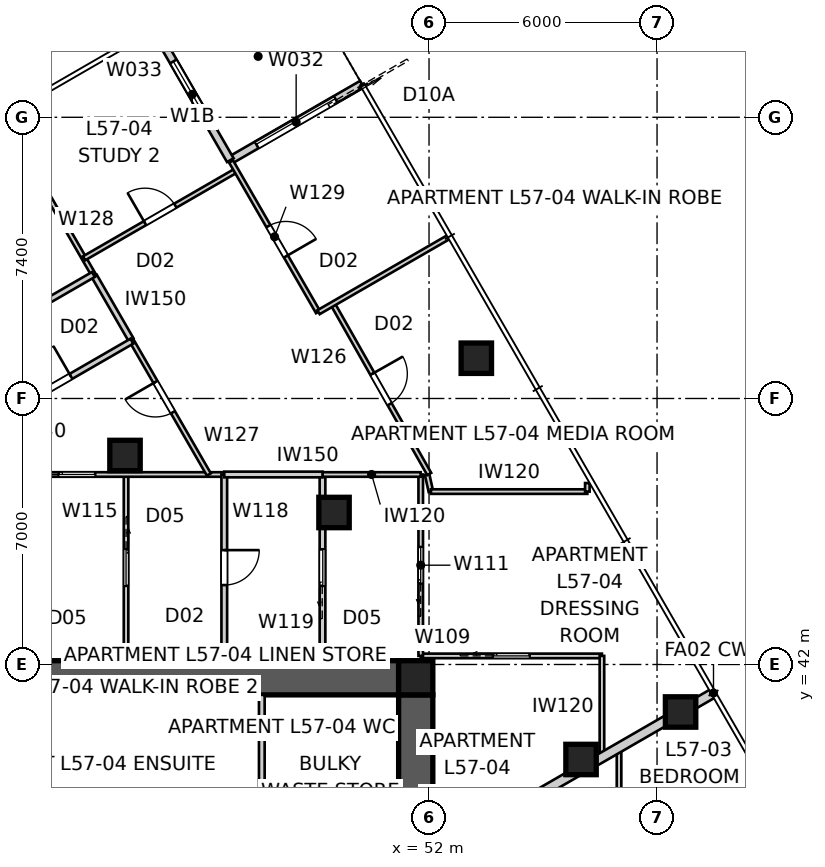
"""IFC4 building model, lengths in metres.
Left out: names, types, materials, properties, quantities, classifications, styles, units other than length and angle.
Written with IfcOpenShell. Run it as: python <this file> out.ifc"""

import sys

from ifc_helpers import new_model, si_unit, direction, frame, frame_2d, origin, origin_2d, place, context, subcontext, project, spatial, polyline, rectangle, outline, extrude, element, fill, save


model = new_model("IFC4")
c1 = context("Model", 3, precision=1e-05, world=origin(), true_north=direction((0.0, 1.0)))
c2 = subcontext(c1, "Body", "Model", "MODEL_VIEW")
j1 = project(units=[si_unit("LENGTHUNIT", "METRE"), si_unit("PLANEANGLEUNIT", "RADIAN")], contexts=[c1])
p1 = place(None, origin())
s1 = spatial("IfcSite", under=j1, at=p1, CompositionType="ELEMENT")
p2 = place(p1, origin())
s2 = spatial("IfcBuilding", under=s1, at=p2, CompositionType="ELEMENT")
p3 = place(p2, frame((0.0, 0.0, 208.2)))
s3 = spatial("IfcBuildingStorey", under=s2, at=p3, CompositionType="ELEMENT", Elevation=208.2)
p4 = place(p3, frame((28.8, 41.65, 0.0), z_axis=(0.0, 0.0, 1.0), x_axis=(1.0, 0.0, 0.0)))
e1 = element("IfcWall", 1, at=p4, inside=s3, PredefinedType="SHEAR", context=c2, shape_type="SweptSolid", body=[
    extrude(outline(polyline([(0.0, -0.45), (22.4, -0.45), (22.4, -0.025), (22.85, -0.025), (22.85, 0.025), (22.4, 0.025), (22.4, 0.45), (0.0, 0.45), (0.0, 0.025), (-0.45, 0.025), (-0.45, -0.025), (0.0, -0.025), (0.0, -0.45)])), origin(), (0.0, 0.0, 1.0), 3.4),
])
p5 = place(p3, frame((51.65, 18.8, 0.0), z_axis=(0.0, 0.0, 1.0), x_axis=(0.0, 1.0, 0.0)))
e2 = element("IfcWall", 2, at=p5, inside=s3, PredefinedType="SHEAR", context=c2, shape_type="SweptSolid", body=[
    extrude(outline(polyline([(0.0, -0.45), (22.4, -0.45), (22.4, -0.025), (22.85, -0.025), (22.85, 0.025), (22.4, 0.025), (22.4, 0.45), (0.0, 0.45), (0.0, 0.025), (-0.45, 0.025), (-0.45, -0.025), (0.0, -0.025), (0.0, -0.45)])), origin(), (0.0, 0.0, 1.0), 3.4),
])
p6 = place(p5, frame((11.14, 0.0, 0.0)))
e3 = element("IfcOpeningElement", 3, at=p6, cuts=e2, PredefinedType="OPENING", context=c2, shape_type="SweptSolid", body=[
    extrude(rectangle(XDim=1.02, YDim=2.4, at=frame_2d((0.51, 1.2))), frame((0.0, 0.46, 0.0), z_axis=(0.0, -1.0, 0.0), x_axis=(1.0, 0.0, 0.0)), (0.0, 0.0, 1.0), 0.92),
])
p7 = place(p3, frame((51.65, 41.65, 0.0), z_axis=(0.0, 0.0, 1.0), x_axis=(1.0, 0.0, 0.0)))
e4 = element("IfcColumn", 4, at=p7, inside=s3, PredefinedType="COLUMN", context=c2, shape_type="SweptSolid", body=[
    extrude(rectangle(XDim=0.9, YDim=0.9, at=origin_2d()), origin(), (0.0, 0.0, 1.0), 3.4),
])
for number, where, z_axis, x_axis in (
    (5, (58.62, 40.75, -0.15), (0.0, 0.0, 1.0), (1.0, 0.0, 0.0)),
    (6, (53.245, 50.06, -0.15), (0.0, 0.0, 1.0), (1.0, 0.0, 0.0)),
):
    element("IfcColumn", number, at=place(p3, frame(where, z_axis=z_axis, x_axis=x_axis)), inside=s3, PredefinedType="COLUMN", context=c2, shape_type="SweptSolid", body=[
        extrude(rectangle(XDim=0.8, YDim=0.8, at=origin_2d()), origin(), (0.0, 0.0, 1.0), 3.55),
    ])
for number, where, z_axis, x_axis in (
    (7, (56.0, 39.5, 0.0), (0.0, 0.0, 1.0), (1.0, 0.0, 0.0)),
    (8, (49.5, 46.0, 0.0), (0.0, 0.0, 1.0), (1.0, 0.0, 0.0)),
    (9, (44.0, 47.5, 0.0), (0.0, 0.0, 1.0), (1.0, 0.0, 0.0)),
):
    element("IfcColumn", number, at=place(p3, frame(where, z_axis=z_axis, x_axis=x_axis)), inside=s3, PredefinedType="COLUMN", context=c2, shape_type="SweptSolid", body=[
        extrude(rectangle(XDim=0.8, YDim=0.8, at=origin_2d()), origin(), (0.0, 0.0, 1.0), 3.4),
    ])
p8 = place(p3, frame((50.236, 57.271, 0.0), z_axis=(0.0, 0.0, 1.0), x_axis=(-0.866026010844, -0.49999894854, 0.0)))
e10 = element("IfcWall", 10, at=p8, inside=s3, PredefinedType="SOLIDWALL", context=c2, shape_type="SweptSolid", body=[
    extrude(rectangle(XDim=4.0, YDim=0.2, at=frame_2d((2.0, 0.0))), origin(), (0.0, 0.0, 1.0), 3.25),
])
p9 = place(p8, frame((0.8, 0.0, 0.0)))
e11 = element("IfcOpeningElement", 11, at=p9, cuts=e10, PredefinedType="OPENING", context=c2, shape_type="SweptSolid", body=[
    extrude(rectangle(XDim=2.4, YDim=2.1, at=frame_2d((1.2, 1.05))), frame((0.0, 0.11, 0.0), z_axis=(0.0, -1.0, 0.0), x_axis=(1.0, 0.0, 0.0)), (0.0, 0.0, 1.0), 0.22),
])
p10 = place(p3, frame((46.771, 55.271, 0.0), z_axis=(0.0, 0.0, 1.0), x_axis=(-0.49999894854, 0.866026010844, 0.0)))
e12 = element("IfcWall", 12, at=p10, inside=s3, PredefinedType="SOLIDWALL", context=c2, shape_type="SweptSolid", body=[
    extrude(rectangle(XDim=4.0, YDim=0.2, at=frame_2d((2.0, 0.0))), origin(), (0.0, 0.0, 1.0), 3.25),
])
p11 = place(p10, frame((1.0, 0.0, 0.45)))
e13 = element("IfcOpeningElement", 13, at=p11, cuts=e12, PredefinedType="OPENING", context=c2, shape_type="SweptSolid", body=[
    extrude(rectangle(XDim=2.0, YDim=1.8, at=frame_2d((1.0, 0.9))), frame((0.0, 0.11, 0.0), z_axis=(0.0, -1.0, 0.0), x_axis=(1.0, 0.0, 0.0)), (0.0, 0.0, 1.0), 0.22),
])
p12 = place(p3, frame((59.486, 41.25, 0.0), z_axis=(0.0, 0.0, 1.0), x_axis=(-0.866020489494, -0.500008511703, 0.0)))
e14 = element("IfcWall", 14, at=p12, inside=s3, PredefinedType="PARTITIONING", context=c2, shape_type="SweptSolid", body=[
    extrude(rectangle(XDim=8.496, YDim=0.25, at=frame_2d((4.248, 0.0))), origin(), (0.0, 0.0, 1.0), 3.25),
])
p13 = place(p3, frame((47.6, 41.2, 0.0), z_axis=(0.0, 0.0, 1.0), x_axis=(0.0, -1.0, 0.0)))
e15 = element("IfcWall", 15, at=p13, inside=s3, PredefinedType="SOLIDWALL", context=c2, shape_type="SweptSolid", body=[
    extrude(rectangle(XDim=5.9, YDim=0.15, at=frame_2d((2.95, 0.0))), origin(), (0.0, 0.0, 1.0), 3.25),
])
p14 = place(p3, frame((57.0, 39.815, 0.0), z_axis=(0.0, 0.0, 1.0), x_axis=(0.0, -1.0, 0.0)))
e16 = element("IfcWall", 16, at=p14, inside=s3, PredefinedType="PARTITIONING", context=c2, shape_type="SweptSolid", body=[
    extrude(rectangle(XDim=21.919, YDim=0.12, at=frame_2d((10.959, 0.0))), origin(), (0.0, 0.0, 1.0), 2.55),
])
p15 = place(p14, frame((7.551, 0.0, 0.0)))
e17 = element("IfcOpeningElement", 17, at=p15, cuts=e16, PredefinedType="OPENING", context=c2, shape_type="SweptSolid", body=[
    extrude(rectangle(XDim=0.92, YDim=2.34, at=frame_2d((0.46, 1.17))), frame((0.0, 0.07, 0.0), z_axis=(0.0, -1.0, 0.0), x_axis=(1.0, 0.0, 0.0)), (0.0, 0.0, 1.0), 0.14),
])
p16 = place(p14, frame((12.32, 0.0, 0.0)))
e18 = element("IfcOpeningElement", 18, at=p16, cuts=e16, PredefinedType="OPENING", context=c2, shape_type="SweptSolid", body=[
    extrude(rectangle(XDim=0.92, YDim=2.34, at=frame_2d((0.46, 1.17))), frame((0.0, 0.07, 0.0), z_axis=(0.0, -1.0, 0.0), x_axis=(1.0, 0.0, 0.0)), (0.0, 0.0, 1.0), 0.14),
])
p17 = place(p3, frame((51.782, 42.226, 0.0), z_axis=(0.0, 0.0, 1.0), x_axis=(1.0, 0.0, 0.0)))
e19 = element("IfcWall", 19, at=p17, inside=s3, PredefinedType="PARTITIONING", context=c2, shape_type="SweptSolid", body=[
    extrude(rectangle(XDim=4.768, YDim=0.12, at=frame_2d((2.384, 0.0))), origin(), (0.0, 0.0, 1.0), 3.25),
])
p18 = place(p17, frame((1.904, 0.0, 0.0)))
e20 = element("IfcOpeningElement", 20, at=p18, cuts=e19, PredefinedType="OPENING", context=c2, shape_type="SweptSolid", body=[
    extrude(rectangle(XDim=0.96, YDim=2.1, at=frame_2d((0.48, 1.05))), frame((0.0, 0.07, 0.0), z_axis=(0.0, -1.0, 0.0), x_axis=(1.0, 0.0, 0.0)), (0.0, 0.0, 1.0), 0.14),
])
p19 = place(p3, frame((56.55, 42.226, 0.0), z_axis=(0.0, 0.0, 1.0), x_axis=(0.0, -1.0, 0.0)))
e21 = element("IfcWall", 21, at=p19, inside=s3, PredefinedType="PARTITIONING", context=c2, shape_type="SweptSolid", body=[
    extrude(rectangle(XDim=2.671, YDim=0.12, at=frame_2d((1.335, 0.0))), origin(), (0.0, 0.0, 1.0), 3.25),
])
p20 = place(p3, frame((51.782, 42.226, 0.0), z_axis=(0.0, 0.0, 1.0), x_axis=(0.0, 1.0, 0.0)))
e22 = element("IfcWall", 22, at=p20, inside=s3, PredefinedType="PARTITIONING", context=c2, shape_type="SweptSolid", body=[
    extrude(rectangle(XDim=4.774, YDim=0.12, at=frame_2d((2.387, 0.0))), origin(), (0.0, 0.0, 1.0), 3.25),
])
p21 = place(p20, frame((1.907, 0.0, 0.0)))
e23 = element("IfcOpeningElement", 23, at=p21, cuts=e22, PredefinedType="OPENING", context=c2, shape_type="SweptSolid", body=[
    extrude(rectangle(XDim=0.96, YDim=2.1, at=frame_2d((0.48, 1.05))), frame((0.0, 0.07, 0.0), z_axis=(0.0, -1.0, 0.0), x_axis=(1.0, 0.0, 0.0)), (0.0, 0.0, 1.0), 0.14),
])
p22 = place(p3, frame((51.949, 47.0, 0.0), z_axis=(0.0, 0.0, 1.0), x_axis=(0.21715477266, -0.976137185395, 0.0)))
e24 = element("IfcWall", 24, at=p22, inside=s3, PredefinedType="PARTITIONING", context=c2, shape_type="SweptSolid", body=[
    extrude(rectangle(XDim=0.461, YDim=0.12, at=frame_2d((0.23, 0.0))), origin(), (0.0, 0.0, 1.0), 3.25),
])
p23 = place(p3, frame((52.049, 46.55, 0.0), z_axis=(0.0, 0.0, 1.0), x_axis=(1.0, 0.0, 0.0)))
e25 = element("IfcWall", 25, at=p23, inside=s3, PredefinedType="PARTITIONING", context=c2, shape_type="SweptSolid", body=[
    extrude(rectangle(XDim=4.116, YDim=0.12, at=frame_2d((2.058, 0.0))), origin(), (0.0, 0.0, 1.0), 3.25),
])
p24 = place(p3, frame((56.166, 46.55, 0.0), z_axis=(0.0, 0.0, 1.0), x_axis=(0.0, 1.0, 0.0)))
e26 = element("IfcWall", 26, at=p24, inside=s3, PredefinedType="PARTITIONING", context=c2, shape_type="SweptSolid", body=[
    extrude(rectangle(XDim=0.225, YDim=0.12, at=frame_2d((0.112, 0.0))), origin(), (0.0, 0.0, 1.0), 3.25),
])
p25 = place(p3, frame((44.028, 47.0, 0.0), z_axis=(0.0, 0.0, 1.0), x_axis=(0.0, -1.0, 0.0)))
e27 = element("IfcWall", 27, at=p25, inside=s3, PredefinedType="PARTITIONING", context=c2, shape_type="SweptSolid", body=[
    extrude(rectangle(XDim=4.9, YDim=0.12, at=frame_2d((2.45, 0.0))), origin(), (0.0, 0.0, 1.0), 3.25),
])
p26 = place(p25, frame((1.97, 0.0, 0.0)))
e28 = element("IfcOpeningElement", 28, at=p26, cuts=e27, PredefinedType="OPENING", context=c2, shape_type="SweptSolid", body=[
    extrude(rectangle(XDim=0.96, YDim=2.1, at=frame_2d((0.48, 1.05))), frame((0.0, 0.07, 0.0), z_axis=(0.0, -1.0, 0.0), x_axis=(1.0, 0.0, 0.0)), (0.0, 0.0, 1.0), 0.14),
])
p27 = place(p3, frame((40.808, 47.0, 0.0), z_axis=(0.0, 0.0, 1.0), x_axis=(1.0, 0.0, 0.0)))
e29 = element("IfcWall", 29, at=p27, inside=s3, PredefinedType="PARTITIONING", context=c2, shape_type="SweptSolid", body=[
    extrude(rectangle(XDim=5.804, YDim=0.12, at=frame_2d((2.902, 0.0))), origin(), (0.0, 0.0, 1.0), 2.55),
])
p28 = place(p27, frame((1.447, 0.0, 0.0)))
e30 = element("IfcOpeningElement", 30, at=p28, cuts=e29, PredefinedType="OPENING", context=c2, shape_type="SweptSolid", body=[
    extrude(rectangle(XDim=0.96, YDim=2.1, at=frame_2d((0.48, 1.05))), frame((0.0, 0.07, 0.0), z_axis=(0.0, -1.0, 0.0), x_axis=(1.0, 0.0, 0.0)), (0.0, 0.0, 1.0), 0.14),
])
p29 = place(p3, frame((46.612, 47.0, 0.0), z_axis=(0.0, 0.0, 1.0), x_axis=(0.0, -1.0, 0.0)))
e31 = element("IfcWall", 31, at=p29, inside=s3, PredefinedType="SOLIDWALL", context=c2, shape_type="SweptSolid", body=[
    extrude(rectangle(XDim=4.9, YDim=0.15, at=frame_2d((2.45, 0.0))), origin(), (0.0, 0.0, 1.0), 3.25),
])
p30 = place(p29, frame((1.99, 0.0, 0.0)))
e32 = element("IfcOpeningElement", 32, at=p30, cuts=e31, PredefinedType="OPENING", context=c2, shape_type="SweptSolid", body=[
    extrude(rectangle(XDim=0.92, YDim=2.34, at=frame_2d((0.46, 1.17))), frame((0.0, 0.085, 0.0), z_axis=(0.0, -1.0, 0.0), x_axis=(1.0, 0.0, 0.0)), (0.0, 0.0, 1.0), 0.17),
])
p31 = place(p3, frame((49.197, 42.1, 0.0), z_axis=(0.0, 0.0, 1.0), x_axis=(0.0, 1.0, 0.0)))
e33 = element("IfcWall", 33, at=p31, inside=s3, PredefinedType="SOLIDWALL", context=c2, shape_type="SweptSolid", body=[
    extrude(rectangle(XDim=4.9, YDim=0.15, at=frame_2d((2.45, 0.0))), origin(), (0.0, 0.0, 1.0), 3.25),
])
p32 = place(p31, frame((1.97, 0.0, 0.0)))
e34 = element("IfcOpeningElement", 34, at=p32, cuts=e33, PredefinedType="OPENING", context=c2, shape_type="SweptSolid", body=[
    extrude(rectangle(XDim=0.96, YDim=2.1, at=frame_2d((0.48, 1.05))), frame((0.0, 0.085, 0.0), z_axis=(0.0, -1.0, 0.0), x_axis=(1.0, 0.0, 0.0)), (0.0, 0.0, 1.0), 0.17),
])
p33 = place(p3, frame((49.197, 47.0, 0.0), z_axis=(0.0, 0.0, 1.0), x_axis=(1.0, 0.0, 0.0)))
e35 = element("IfcWall", 35, at=p33, inside=s3, PredefinedType="PARTITIONING", context=c2, shape_type="SweptSolid", body=[
    extrude(rectangle(XDim=2.585, YDim=0.12, at=frame_2d((1.292, 0.0))), origin(), (0.0, 0.0, 1.0), 3.25),
])
p34 = place(p3, frame((46.612, 47.0, 0.0), z_axis=(0.0, 0.0, 1.0), x_axis=(1.0, 0.0, 0.0)))
e36 = element("IfcWall", 36, at=p34, inside=s3, PredefinedType="SOLIDWALL", context=c2, shape_type="SweptSolid", body=[
    extrude(rectangle(XDim=2.585, YDim=0.15, at=frame_2d((1.292, 0.0))), origin(), (0.0, 0.0, 1.0), 3.25),
])
p35 = place(p3, frame((43.193, 52.219, 0.0), z_axis=(0.0, 0.0, 1.0), x_axis=(-0.50000634465, 0.866021740668, 0.0)))
e37 = element("IfcWall", 37, at=p35, inside=s3, PredefinedType="PARTITIONING", context=c2, shape_type="SweptSolid", body=[
    extrude(rectangle(XDim=4.814, YDim=0.12, at=frame_2d((2.407, 0.0))), origin(), (0.0, 0.0, 1.0), 3.25),
])
p36 = place(p3, frame((49.467, 51.487, 0.0), z_axis=(0.0, 0.0, 1.0), x_axis=(0.49354052196, -0.869722802497, 0.0)))
e38 = element("IfcWall", 38, at=p36, inside=s3, PredefinedType="PARTITIONING", context=c2, shape_type="SweptSolid", body=[
    extrude(rectangle(XDim=5.145, YDim=0.12, at=frame_2d((2.572, 0.0))), origin(), (0.0, 0.0, 1.0), 3.25),
])
p37 = place(p36, frame((2.112, 0.0, 0.0)))
e39 = element("IfcOpeningElement", 39, at=p37, cuts=e38, PredefinedType="OPENING", context=c2, shape_type="SweptSolid", body=[
    extrude(rectangle(XDim=0.92, YDim=2.34, at=frame_2d((0.46, 1.17))), frame((0.0, 0.07, 0.0), z_axis=(0.0, -1.0, 0.0), x_axis=(1.0, 0.0, 0.0)), (0.0, 0.0, 1.0), 0.14),
])
p38 = place(p3, frame((46.207, 47.0, 0.0), z_axis=(0.0, 0.0, 1.0), x_axis=(-0.499986975689, 0.866032923243, 0.0)))
e40 = element("IfcWall", 40, at=p38, inside=s3, PredefinedType="PARTITIONING", context=c2, shape_type="SweptSolid", body=[
    extrude(rectangle(XDim=4.101, YDim=0.12, at=frame_2d((2.051, 0.0))), origin(), (0.0, 0.0, 1.0), 3.25),
])
p39 = place(p38, frame((1.891, 0.0, 0.0)))
e41 = element("IfcOpeningElement", 41, at=p39, cuts=e40, PredefinedType="OPENING", context=c2, shape_type="SweptSolid", body=[
    extrude(rectangle(XDim=0.92, YDim=2.34, at=frame_2d((0.46, 1.17))), frame((0.0, 0.07, 0.0), z_axis=(0.0, -1.0, 0.0), x_axis=(1.0, 0.0, 0.0)), (0.0, 0.0, 1.0), 0.14),
])
p40 = place(p3, frame((42.922, 52.688, 0.0), z_axis=(0.0, 0.0, 1.0), x_axis=(0.866025598446, 0.499999662836, 0.0)))
e42 = element("IfcWall", 42, at=p40, inside=s3, PredefinedType="PARTITIONING", context=c2, shape_type="SweptSolid", body=[
    extrude(rectangle(XDim=4.625, YDim=0.12, at=frame_2d((2.312, 0.0))), origin(), (0.0, 0.0, 1.0), 3.25),
])
p41 = place(p40, frame((1.853, 0.0, 0.0)))
e43 = element("IfcOpeningElement", 43, at=p41, cuts=e42, PredefinedType="OPENING", context=c2, shape_type="SweptSolid", body=[
    extrude(rectangle(XDim=0.92, YDim=2.34, at=frame_2d((0.46, 1.17))), frame((0.0, 0.07, 0.0), z_axis=(0.0, -1.0, 0.0), x_axis=(1.0, 0.0, 0.0)), (0.0, 0.0, 1.0), 0.14),
])
p42 = place(p3, frame((46.792, 55.237, 0.0), z_axis=(0.0, 0.0, 1.0), x_axis=(0.500018023529, -0.866014997645, 0.0)))
e44 = element("IfcWall", 44, at=p42, inside=s3, PredefinedType="PARTITIONING", context=c2, shape_type="SweptSolid", body=[
    extrude(rectangle(XDim=4.576, YDim=0.12, at=frame_2d((2.288, 0.0))), origin(), (0.0, 0.0, 1.0), 3.25),
])
p43 = place(p42, frame((1.964, 0.0, 0.0)))
e45 = element("IfcOpeningElement", 45, at=p43, cuts=e44, PredefinedType="OPENING", context=c2, shape_type="SweptSolid", body=[
    extrude(rectangle(XDim=0.92, YDim=2.34, at=frame_2d((0.46, 1.17))), frame((0.0, 0.07, 0.0), z_axis=(0.0, -1.0, 0.0), x_axis=(1.0, 0.0, 0.0)), (0.0, 0.0, 1.0), 0.14),
])
p44 = place(p3, frame((49.093, 51.271, 0.0), z_axis=(0.0, 0.0, 1.0), x_axis=(0.866020906874, 0.500007788796, 0.0)))
e46 = element("IfcWall", 46, at=p44, inside=s3, PredefinedType="PARTITIONING", context=c2, shape_type="SweptSolid", body=[
    extrude(rectangle(XDim=3.95, YDim=0.12, at=frame_2d((1.975, 0.0))), origin(), (0.0, 0.0, 1.0), 3.25),
])
p45 = place(p3, frame((44.156, 50.552, 0.0), z_axis=(0.0, 0.0, 1.0), x_axis=(-0.50001143954, 0.866018799062, 0.0)))
e47 = element("IfcWall", 47, at=p45, inside=s3, PredefinedType="SOLIDWALL", context=c2, shape_type="SweptSolid", body=[
    extrude(rectangle(XDim=1.926, YDim=0.15, at=frame_2d((0.963, 0.0))), origin(), (0.0, 0.0, 1.0), 3.25),
])
p46 = place(p3, frame((43.168, 52.263, 0.0), z_axis=(0.0, 0.0, 1.0), x_axis=(-0.866025598446, -0.499999662836, 0.0)))
e48 = element("IfcWall", 48, at=p46, inside=s3, PredefinedType="SOLIDWALL", context=c2, shape_type="SweptSolid", body=[
    extrude(rectangle(XDim=4.625, YDim=0.15, at=frame_2d((2.312, 0.0))), origin(), (0.0, 0.0, 1.0), 3.25),
])
p47 = place(p46, frame((1.853, 0.0, 0.0)))
e49 = element("IfcOpeningElement", 49, at=p47, cuts=e48, PredefinedType="OPENING", context=c2, shape_type="SweptSolid", body=[
    extrude(rectangle(XDim=0.92, YDim=2.34, at=frame_2d((0.46, 1.17))), frame((0.0, 0.085, 0.0), z_axis=(0.0, -1.0, 0.0), x_axis=(1.0, 0.0, 0.0)), (0.0, 0.0, 1.0), 0.17),
])
p48 = place(p3, frame((40.176, 48.196, 0.0), z_axis=(0.0, 0.0, 1.0), x_axis=(0.866025598446, 0.499999662836, 0.0)))
e50 = element("IfcWall", 50, at=p48, inside=s3, PredefinedType="SOLIDWALL", context=c2, shape_type="SweptSolid", body=[
    extrude(rectangle(XDim=4.625, YDim=0.15, at=frame_2d((2.312, 0.0))), origin(), (0.0, 0.0, 1.0), 3.25),
])
p49 = place(p48, frame((1.853, 0.0, 0.0)))
e51 = element("IfcOpeningElement", 51, at=p49, cuts=e50, PredefinedType="OPENING", context=c2, shape_type="SweptSolid", body=[
    extrude(rectangle(XDim=0.92, YDim=2.34, at=frame_2d((0.46, 1.17))), frame((0.0, 0.085, 0.0), z_axis=(0.0, -1.0, 0.0), x_axis=(1.0, 0.0, 0.0)), (0.0, 0.0, 1.0), 0.17),
])
p50 = place(p9, origin())
e52 = element("IfcDoor", 52, at=p50, inside=s3, OperationType="SLIDING_TO_LEFT", PredefinedType="DOOR", context=c2, shape_type="SweptSolid", body=[
    extrude(rectangle(XDim=2.4, YDim=2.1, at=frame_2d((1.2, 1.05))), frame((0.0, 0.025, 0.0), z_axis=(0.0, -1.0, 0.0), x_axis=(1.0, 0.0, 0.0)), (0.0, 0.0, 1.0), 0.05),
])
fill(e11, e52)
p51 = place(p11, origin())
e53 = element("IfcWindow", 53, at=p51, inside=s3, PartitioningType="SINGLE_PANEL", PredefinedType="WINDOW", context=c2, shape_type="SweptSolid", body=[
    extrude(rectangle(XDim=2.0, YDim=1.8, at=frame_2d((1.0, 0.9))), frame((0.0, 0.03, 0.0), z_axis=(0.0, -1.0, 0.0), x_axis=(1.0, 0.0, 0.0)), (0.0, 0.0, 1.0), 0.06),
])
fill(e13, e53)
p52 = place(p26, origin())
e54 = element("IfcDoor", 54, at=p52, inside=s3, OperationType="SLIDING_TO_LEFT", PredefinedType="DOOR", context=c2, shape_type="SweptSolid", body=[
    extrude(rectangle(XDim=0.96, YDim=2.1, at=frame_2d((0.48, 1.05))), frame((0.0, 0.025, 0.0), z_axis=(0.0, -1.0, 0.0), x_axis=(1.0, 0.0, 0.0)), (0.0, 0.0, 1.0), 0.05),
])
fill(e28, e54)
p53 = place(p28, origin())
e55 = element("IfcDoor", 55, at=p53, inside=s3, OperationType="SLIDING_TO_LEFT", PredefinedType="DOOR", context=c2, shape_type="SweptSolid", body=[
    extrude(rectangle(XDim=0.96, YDim=2.1, at=frame_2d((0.48, 1.05))), frame((0.0, 0.025, 0.0), z_axis=(0.0, -1.0, 0.0), x_axis=(1.0, 0.0, 0.0)), (0.0, 0.0, 1.0), 0.05),
])
fill(e30, e55)
p54 = place(p30, origin())
e56 = element("IfcDoor", 56, at=p54, inside=s3, OperationType="SINGLE_SWING_LEFT", PredefinedType="DOOR", context=c2, shape_type="SweptSolid", body=[
    extrude(rectangle(XDim=0.92, YDim=2.34, at=frame_2d((0.46, 1.17))), frame((0.0, 0.025, 0.0), z_axis=(0.0, -1.0, 0.0), x_axis=(1.0, 0.0, 0.0)), (0.0, 0.0, 1.0), 0.05),
])
fill(e32, e56)
p55 = place(p49, origin())
e57 = element("IfcDoor", 57, at=p55, inside=s3, OperationType="SINGLE_SWING_RIGHT", PredefinedType="DOOR", context=c2, shape_type="SweptSolid", body=[
    extrude(rectangle(XDim=0.92, YDim=2.34, at=frame_2d((0.46, 1.17))), frame((0.0, 0.025, 0.0), z_axis=(0.0, -1.0, 0.0), x_axis=(1.0, 0.0, 0.0)), (0.0, 0.0, 1.0), 0.05),
])
fill(e51, e57)
p56 = place(p39, origin())
e58 = element("IfcDoor", 58, at=p56, inside=s3, OperationType="SINGLE_SWING_RIGHT", PredefinedType="DOOR", context=c2, shape_type="SweptSolid", body=[
    extrude(rectangle(XDim=0.92, YDim=2.34, at=frame_2d((0.46, 1.17))), frame((0.0, 0.025, 0.0), z_axis=(0.0, -1.0, 0.0), x_axis=(1.0, 0.0, 0.0)), (0.0, 0.0, 1.0), 0.05),
])
fill(e41, e58)
p57 = place(p32, origin())
e59 = element("IfcDoor", 59, at=p57, inside=s3, OperationType="SLIDING_TO_LEFT", PredefinedType="DOOR", context=c2, shape_type="SweptSolid", body=[
    extrude(rectangle(XDim=0.96, YDim=2.1, at=frame_2d((0.48, 1.05))), frame((0.0, 0.025, 0.0), z_axis=(0.0, -1.0, 0.0), x_axis=(1.0, 0.0, 0.0)), (0.0, 0.0, 1.0), 0.05),
])
fill(e34, e59)
p58 = place(p37, origin())
e60 = element("IfcDoor", 60, at=p58, inside=s3, OperationType="SINGLE_SWING_LEFT", PredefinedType="DOOR", context=c2, shape_type="SweptSolid", body=[
    extrude(rectangle(XDim=0.92, YDim=2.34, at=frame_2d((0.46, 1.17))), frame((0.0, 0.025, 0.0), z_axis=(0.0, -1.0, 0.0), x_axis=(1.0, 0.0, 0.0)), (0.0, 0.0, 1.0), 0.05),
])
fill(e39, e60)
p59 = place(p41, origin())
e61 = element("IfcDoor", 61, at=p59, inside=s3, OperationType="SINGLE_SWING_LEFT", PredefinedType="DOOR", context=c2, shape_type="SweptSolid", body=[
    extrude(rectangle(XDim=0.92, YDim=2.34, at=frame_2d((0.46, 1.17))), frame((0.0, 0.025, 0.0), z_axis=(0.0, -1.0, 0.0), x_axis=(1.0, 0.0, 0.0)), (0.0, 0.0, 1.0), 0.05),
])
fill(e43, e61)
p60 = place(p43, origin())
e62 = element("IfcDoor", 62, at=p60, inside=s3, OperationType="SINGLE_SWING_RIGHT", PredefinedType="DOOR", context=c2, shape_type="SweptSolid", body=[
    extrude(rectangle(XDim=0.92, YDim=2.34, at=frame_2d((0.46, 1.17))), frame((0.0, 0.025, 0.0), z_axis=(0.0, -1.0, 0.0), x_axis=(1.0, 0.0, 0.0)), (0.0, 0.0, 1.0), 0.05),
])
fill(e45, e62)
p61 = place(p21, origin())
e63 = element("IfcDoor", 63, at=p61, inside=s3, OperationType="SLIDING_TO_LEFT", PredefinedType="DOOR", context=c2, shape_type="SweptSolid", body=[
    extrude(rectangle(XDim=0.96, YDim=2.1, at=frame_2d((0.48, 1.05))), frame((0.0, 0.025, 0.0), z_axis=(0.0, -1.0, 0.0), x_axis=(1.0, 0.0, 0.0)), (0.0, 0.0, 1.0), 0.05),
])
fill(e23, e63)
p62 = place(p18, origin())
e64 = element("IfcDoor", 64, at=p62, inside=s3, OperationType="SLIDING_TO_LEFT", PredefinedType="DOOR", context=c2, shape_type="SweptSolid", body=[
    extrude(rectangle(XDim=0.96, YDim=2.1, at=frame_2d((0.48, 1.05))), frame((0.0, 0.025, 0.0), z_axis=(0.0, -1.0, 0.0), x_axis=(1.0, 0.0, 0.0)), (0.0, 0.0, 1.0), 0.05),
])
fill(e20, e64)
save(model, sys.argv[1])
